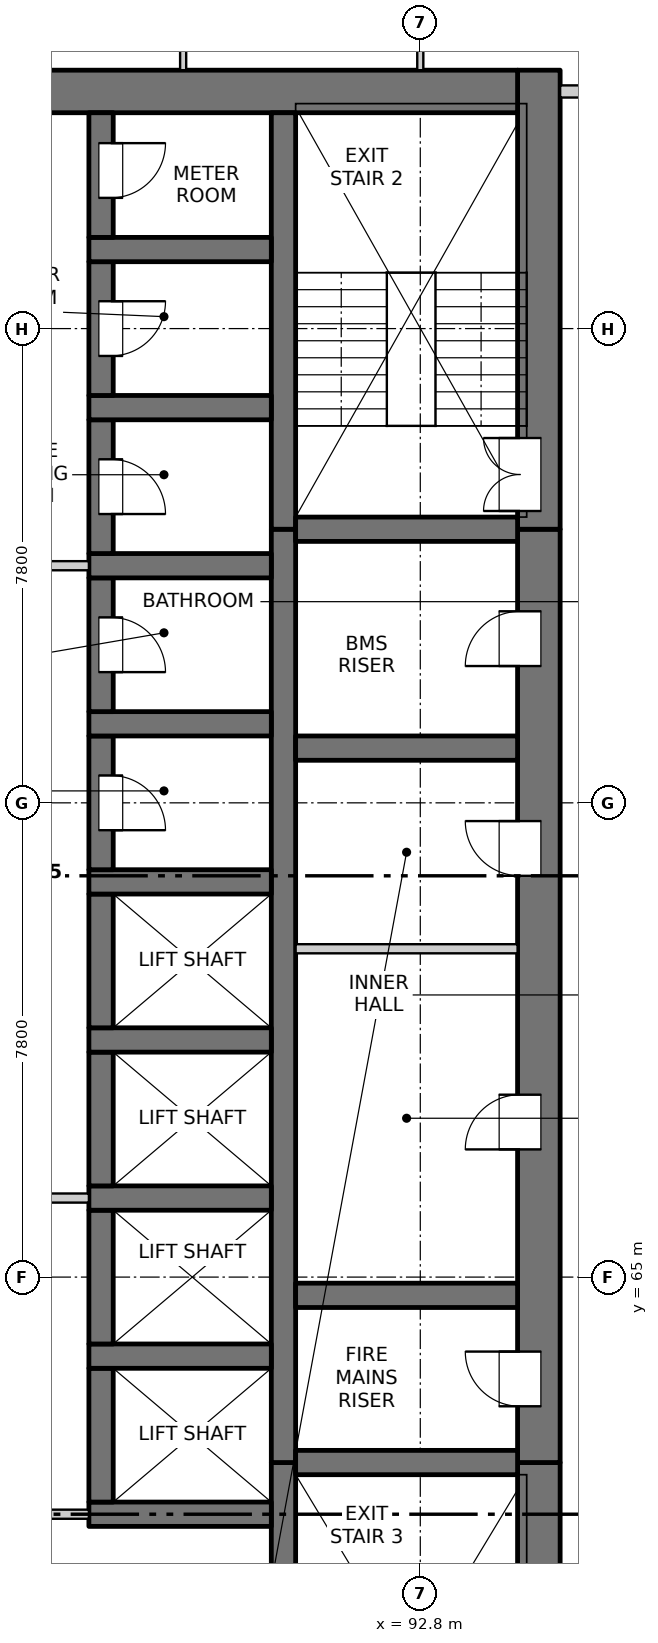
"""IFC4 building model, lengths in metres.
Left out: names, types, materials, properties, quantities, classifications, styles, units other than length and angle.
Written with IfcOpenShell. Run it as: python <this file> out.ifc"""

import sys

from ifc_helpers import new_model, si_unit, direction, frame, frame_2d, origin, place, context, subcontext, project, spatial, rectangle, extrude, element, fill, save


model = new_model("IFC4")
c1 = context("Model", 3, precision=1e-05, world=origin(), true_north=direction((0.0, 1.0)))
c2 = subcontext(c1, "Body", "Model", "MODEL_VIEW")
j1 = project(units=[si_unit("LENGTHUNIT", "METRE"), si_unit("PLANEANGLEUNIT", "RADIAN")], contexts=[c1])
p1 = place(None, origin())
s1 = spatial("IfcSite", under=j1, at=p1, CompositionType="ELEMENT")
p2 = place(p1, origin())
s2 = spatial("IfcBuilding", under=s1, at=p2, CompositionType="ELEMENT")
p3 = place(p2, frame((0.0, 0.0, 43.3)))
s3 = spatial("IfcBuildingStorey", under=s2, at=p3, CompositionType="ELEMENT", Elevation=43.3)
p4 = place(p3, frame((94.75, 54.9, -0.25), z_axis=(0.0, 0.0, 1.0), x_axis=(0.0, 1.0, 0.0)))
e1 = element("IfcWall", 1, at=p4, inside=s3, PredefinedType="SOLIDWALL", context=c2, shape_type="SweptSolid", body=[
    extrude(rectangle(XDim=7.05, YDim=0.7, at=frame_2d((3.525, 0.0))), origin(), (0.0, 0.0, 1.0), 3.35),
])
p5 = place(p4, frame((0.75, 0.0, 0.25)))
e2 = element("IfcOpeningElement", 2, at=p5, cuts=e1, PredefinedType="OPENING", context=c2, shape_type="SweptSolid", body=[
    extrude(rectangle(XDim=1.2, YDim=2.1, at=frame_2d((0.6, 1.05))), frame((0.0, 0.36, 0.0), z_axis=(0.0, -1.0, 0.0), x_axis=(1.0, 0.0, 0.0)), (0.0, 0.0, 1.0), 0.72),
])
p6 = place(p3, frame((94.75, 61.95, -0.25), z_axis=(0.0, 0.0, 1.0), x_axis=(0.0, 1.0, 0.0)))
e3 = element("IfcWall", 3, at=p6, inside=s3, PredefinedType="SOLIDWALL", context=c2, shape_type="SweptSolid", body=[
    extrude(rectangle(XDim=15.35, YDim=0.7, at=frame_2d((7.675, 0.0))), origin(), (0.0, 0.0, 1.0), 3.35),
])
p7 = place(p6, frame((0.925, 0.0, 0.25)))
e4 = element("IfcOpeningElement", 4, at=p7, cuts=e3, PredefinedType="OPENING", context=c2, shape_type="SweptSolid", body=[
    extrude(rectangle(XDim=0.9, YDim=2.1, at=frame_2d((0.45, 1.05))), frame((0.0, 0.36, 0.0), z_axis=(0.0, -1.0, 0.0), x_axis=(1.0, 0.0, 0.0)), (0.0, 0.0, 1.0), 0.72),
])
p8 = place(p6, frame((5.15, 0.0, 0.25)))
e5 = element("IfcOpeningElement", 5, at=p8, cuts=e3, PredefinedType="OPENING", context=c2, shape_type="SweptSolid", body=[
    extrude(rectangle(XDim=0.9, YDim=2.1, at=frame_2d((0.45, 1.05))), frame((0.0, 0.36, 0.0), z_axis=(0.0, -1.0, 0.0), x_axis=(1.0, 0.0, 0.0)), (0.0, 0.0, 1.0), 0.72),
])
p9 = place(p6, frame((9.65, 0.0, 0.25)))
e6 = element("IfcOpeningElement", 6, at=p9, cuts=e3, PredefinedType="OPENING", context=c2, shape_type="SweptSolid", body=[
    extrude(rectangle(XDim=0.9, YDim=2.1, at=frame_2d((0.45, 1.05))), frame((0.0, 0.36, 0.0), z_axis=(0.0, -1.0, 0.0), x_axis=(1.0, 0.0, 0.0)), (0.0, 0.0, 1.0), 0.72),
])
p10 = place(p6, frame((13.1, 0.0, 0.25)))
e7 = element("IfcOpeningElement", 7, at=p10, cuts=e3, PredefinedType="OPENING", context=c2, shape_type="SweptSolid", body=[
    extrude(rectangle(XDim=0.9, YDim=2.1, at=frame_2d((0.45, 1.05))), frame((0.0, 0.36, 0.0), z_axis=(0.0, -1.0, 0.0), x_axis=(1.0, 0.0, 0.0)), (0.0, 0.0, 1.0), 0.72),
])
p11 = place(p3, frame((94.75, 77.3, -0.25), z_axis=(0.0, 0.0, 1.0), x_axis=(0.0, 1.0, 0.0)))
e8 = element("IfcWall", 8, at=p11, inside=s3, PredefinedType="SOLIDWALL", context=c2, shape_type="SweptSolid", body=[
    extrude(rectangle(XDim=7.55, YDim=0.7, at=frame_2d((3.775, 0.0))), origin(), (0.0, 0.0, 1.0), 3.35),
])
p12 = place(p11, frame((0.3, 0.0, 0.25)))
e9 = element("IfcOpeningElement", 9, at=p12, cuts=e8, PredefinedType="OPENING", context=c2, shape_type="SweptSolid", body=[
    extrude(rectangle(XDim=1.2, YDim=2.1, at=frame_2d((0.6, 1.05))), frame((0.0, 0.36, 0.0), z_axis=(0.0, -1.0, 0.0), x_axis=(1.0, 0.0, 0.0)), (0.0, 0.0, 1.0), 0.72),
])
p13 = place(p3, frame((75.6, 84.5, -0.25), z_axis=(0.0, 0.0, 1.0), x_axis=(1.0, 0.0, 0.0)))
e10 = element("IfcWall", 10, at=p13, inside=s3, PredefinedType="SOLIDWALL", context=c2, shape_type="SweptSolid", body=[
    extrude(rectangle(XDim=18.8, YDim=0.7, at=frame_2d((9.4, 0.0))), origin(), (0.0, 0.0, 1.0), 3.35),
])
p14 = place(p3, frame((90.55, 55.6, -0.25), z_axis=(0.0, 0.0, 1.0), x_axis=(0.0, 1.0, 0.0)))
e11 = element("IfcWall", 11, at=p14, inside=s3, PredefinedType="SOLIDWALL", context=c2, shape_type="SweptSolid", body=[
    extrude(rectangle(XDim=6.35, YDim=0.4, at=frame_2d((3.175, 0.0))), origin(), (0.0, 0.0, 1.0), 3.35),
])
p15 = place(p3, frame((90.55, 61.95, -0.25), z_axis=(0.0, 0.0, 1.0), x_axis=(0.0, 1.0, 0.0)))
e12 = element("IfcWall", 12, at=p15, inside=s3, PredefinedType="SOLIDWALL", context=c2, shape_type="SweptSolid", body=[
    extrude(rectangle(XDim=15.35, YDim=0.4, at=frame_2d((7.675, 0.0))), origin(), (0.0, 0.0, 1.0), 3.35),
])
p16 = place(p3, frame((90.55, 77.3, -0.25), z_axis=(0.0, 0.0, 1.0), x_axis=(0.0, 1.0, 0.0)))
e13 = element("IfcWall", 13, at=p16, inside=s3, PredefinedType="SOLIDWALL", context=c2, shape_type="SweptSolid", body=[
    extrude(rectangle(XDim=6.85, YDim=0.4, at=frame_2d((3.425, 0.0))), origin(), (0.0, 0.0, 1.0), 3.35),
])
p17 = place(p3, frame((87.35, 61.1, -0.25), z_axis=(0.0, 0.0, 1.0), x_axis=(1.0, 0.0, 0.0)))
e14 = element("IfcWall", 14, at=p17, inside=s3, PredefinedType="SOLIDWALL", context=c2, shape_type="SweptSolid", body=[
    extrude(rectangle(XDim=3.0, YDim=0.4, at=frame_2d((1.5, 0.0))), origin(), (0.0, 0.0, 1.0), 3.35),
])
p18 = place(p3, frame((87.55, 61.3, -0.25), z_axis=(0.0, 0.0, 1.0), x_axis=(0.0, 1.0, 0.0)))
e15 = element("IfcWall", 15, at=p18, inside=s3, PredefinedType="SOLIDWALL", context=c2, shape_type="SweptSolid", body=[
    extrude(rectangle(XDim=2.2, YDim=0.4, at=frame_2d((1.1, 0.0))), origin(), (0.0, 0.0, 1.0), 3.35),
])
p19 = place(p3, frame((87.35, 63.7, -0.25), z_axis=(0.0, 0.0, 1.0), x_axis=(1.0, 0.0, 0.0)))
e16 = element("IfcWall", 16, at=p19, inside=s3, PredefinedType="SOLIDWALL", context=c2, shape_type="SweptSolid", body=[
    extrude(rectangle(XDim=3.0, YDim=0.4, at=frame_2d((1.5, 0.0))), origin(), (0.0, 0.0, 1.0), 3.35),
])
p20 = place(p3, frame((87.55, 63.9, -0.25), z_axis=(0.0, 0.0, 1.0), x_axis=(0.0, 1.0, 0.0)))
e17 = element("IfcWall", 17, at=p20, inside=s3, PredefinedType="SOLIDWALL", context=c2, shape_type="SweptSolid", body=[
    extrude(rectangle(XDim=2.2, YDim=0.4, at=frame_2d((1.1, 0.0))), origin(), (0.0, 0.0, 1.0), 3.35),
])
p21 = place(p3, frame((87.35, 66.3, -0.25), z_axis=(0.0, 0.0, 1.0), x_axis=(1.0, 0.0, 0.0)))
e18 = element("IfcWall", 18, at=p21, inside=s3, PredefinedType="SOLIDWALL", context=c2, shape_type="SweptSolid", body=[
    extrude(rectangle(XDim=3.0, YDim=0.4, at=frame_2d((1.5, 0.0))), origin(), (0.0, 0.0, 1.0), 3.35),
])
p22 = place(p3, frame((87.55, 66.5, -0.25), z_axis=(0.0, 0.0, 1.0), x_axis=(0.0, 1.0, 0.0)))
e19 = element("IfcWall", 19, at=p22, inside=s3, PredefinedType="SOLIDWALL", context=c2, shape_type="SweptSolid", body=[
    extrude(rectangle(XDim=2.2, YDim=0.4, at=frame_2d((1.1, 0.0))), origin(), (0.0, 0.0, 1.0), 3.35),
])
p23 = place(p3, frame((87.35, 68.9, -0.25), z_axis=(0.0, 0.0, 1.0), x_axis=(1.0, 0.0, 0.0)))
e20 = element("IfcWall", 20, at=p23, inside=s3, PredefinedType="SOLIDWALL", context=c2, shape_type="SweptSolid", body=[
    extrude(rectangle(XDim=3.0, YDim=0.4, at=frame_2d((1.5, 0.0))), origin(), (0.0, 0.0, 1.0), 3.35),
])
p24 = place(p3, frame((87.55, 69.1, -0.25), z_axis=(0.0, 0.0, 1.0), x_axis=(0.0, 1.0, 0.0)))
e21 = element("IfcWall", 21, at=p24, inside=s3, PredefinedType="SOLIDWALL", context=c2, shape_type="SweptSolid", body=[
    extrude(rectangle(XDim=2.2, YDim=0.4, at=frame_2d((1.1, 0.0))), origin(), (0.0, 0.0, 1.0), 3.35),
])
p25 = place(p3, frame((87.35, 71.5, -0.25), z_axis=(0.0, 0.0, 1.0), x_axis=(1.0, 0.0, 0.0)))
e22 = element("IfcWall", 22, at=p25, inside=s3, PredefinedType="SOLIDWALL", context=c2, shape_type="SweptSolid", body=[
    extrude(rectangle(XDim=3.0, YDim=0.4, at=frame_2d((1.5, 0.0))), origin(), (0.0, 0.0, 1.0), 3.35),
])
p26 = place(p3, frame((87.55, 71.7, -0.25), z_axis=(0.0, 0.0, 1.0), x_axis=(0.0, 1.0, 0.0)))
e23 = element("IfcWall", 23, at=p26, inside=s3, PredefinedType="SOLIDWALL", context=c2, shape_type="SweptSolid", body=[
    extrude(rectangle(XDim=2.2, YDim=0.4, at=frame_2d((1.1, 0.0))), origin(), (0.0, 0.0, 1.0), 3.35),
])
p27 = place(p26, frame((0.65, 0.0, 0.25)))
e24 = element("IfcOpeningElement", 24, at=p27, cuts=e23, PredefinedType="OPENING", context=c2, shape_type="SweptSolid", body=[
    extrude(rectangle(XDim=0.9, YDim=2.1, at=frame_2d((0.45, 1.05))), frame((0.0, 0.21, 0.0), z_axis=(0.0, -1.0, 0.0), x_axis=(1.0, 0.0, 0.0)), (0.0, 0.0, 1.0), 0.42),
])
p28 = place(p3, frame((87.35, 74.1, -0.25), z_axis=(0.0, 0.0, 1.0), x_axis=(1.0, 0.0, 0.0)))
e25 = element("IfcWall", 25, at=p28, inside=s3, PredefinedType="SOLIDWALL", context=c2, shape_type="SweptSolid", body=[
    extrude(rectangle(XDim=3.0, YDim=0.4, at=frame_2d((1.5, 0.0))), origin(), (0.0, 0.0, 1.0), 3.35),
])
p29 = place(p3, frame((87.55, 74.3, -0.25), z_axis=(0.0, 0.0, 1.0), x_axis=(0.0, 1.0, 0.0)))
e26 = element("IfcWall", 26, at=p29, inside=s3, PredefinedType="SOLIDWALL", context=c2, shape_type="SweptSolid", body=[
    extrude(rectangle(XDim=2.2, YDim=0.4, at=frame_2d((1.1, 0.0))), origin(), (0.0, 0.0, 1.0), 3.35),
])
p30 = place(p29, frame((0.65, 0.0, 0.25)))
e27 = element("IfcOpeningElement", 27, at=p30, cuts=e26, PredefinedType="OPENING", context=c2, shape_type="SweptSolid", body=[
    extrude(rectangle(XDim=0.9, YDim=2.1, at=frame_2d((0.45, 1.05))), frame((0.0, 0.21, 0.0), z_axis=(0.0, -1.0, 0.0), x_axis=(1.0, 0.0, 0.0)), (0.0, 0.0, 1.0), 0.42),
])
p31 = place(p3, frame((87.35, 76.7, -0.25), z_axis=(0.0, 0.0, 1.0), x_axis=(1.0, 0.0, 0.0)))
e28 = element("IfcWall", 28, at=p31, inside=s3, PredefinedType="SOLIDWALL", context=c2, shape_type="SweptSolid", body=[
    extrude(rectangle(XDim=3.0, YDim=0.4, at=frame_2d((1.5, 0.0))), origin(), (0.0, 0.0, 1.0), 3.35),
])
p32 = place(p3, frame((87.55, 76.9, -0.25), z_axis=(0.0, 0.0, 1.0), x_axis=(0.0, 1.0, 0.0)))
e29 = element("IfcWall", 29, at=p32, inside=s3, PredefinedType="SOLIDWALL", context=c2, shape_type="SweptSolid", body=[
    extrude(rectangle(XDim=2.2, YDim=0.4, at=frame_2d((1.1, 0.0))), origin(), (0.0, 0.0, 1.0), 3.35),
])
p33 = place(p32, frame((0.65, 0.0, 0.25)))
e30 = element("IfcOpeningElement", 30, at=p33, cuts=e29, PredefinedType="OPENING", context=c2, shape_type="SweptSolid", body=[
    extrude(rectangle(XDim=0.9, YDim=2.1, at=frame_2d((0.45, 1.05))), frame((0.0, 0.21, 0.0), z_axis=(0.0, -1.0, 0.0), x_axis=(1.0, 0.0, 0.0)), (0.0, 0.0, 1.0), 0.42),
])
p34 = place(p3, frame((87.35, 79.3, -0.25), z_axis=(0.0, 0.0, 1.0), x_axis=(1.0, 0.0, 0.0)))
e31 = element("IfcWall", 31, at=p34, inside=s3, PredefinedType="SOLIDWALL", context=c2, shape_type="SweptSolid", body=[
    extrude(rectangle(XDim=3.0, YDim=0.4, at=frame_2d((1.5, 0.0))), origin(), (0.0, 0.0, 1.0), 3.35),
])
p35 = place(p3, frame((87.55, 79.5, -0.25), z_axis=(0.0, 0.0, 1.0), x_axis=(0.0, 1.0, 0.0)))
e32 = element("IfcWall", 32, at=p35, inside=s3, PredefinedType="SOLIDWALL", context=c2, shape_type="SweptSolid", body=[
    extrude(rectangle(XDim=2.2, YDim=0.4, at=frame_2d((1.1, 0.0))), origin(), (0.0, 0.0, 1.0), 3.35),
])
p36 = place(p35, frame((0.65, 0.0, 0.25)))
e33 = element("IfcOpeningElement", 33, at=p36, cuts=e32, PredefinedType="OPENING", context=c2, shape_type="SweptSolid", body=[
    extrude(rectangle(XDim=0.9, YDim=2.1, at=frame_2d((0.45, 1.05))), frame((0.0, 0.21, 0.0), z_axis=(0.0, -1.0, 0.0), x_axis=(1.0, 0.0, 0.0)), (0.0, 0.0, 1.0), 0.42),
])
p37 = place(p3, frame((87.35, 81.9, -0.25), z_axis=(0.0, 0.0, 1.0), x_axis=(1.0, 0.0, 0.0)))
e34 = element("IfcWall", 34, at=p37, inside=s3, PredefinedType="SOLIDWALL", context=c2, shape_type="SweptSolid", body=[
    extrude(rectangle(XDim=3.0, YDim=0.4, at=frame_2d((1.5, 0.0))), origin(), (0.0, 0.0, 1.0), 3.35),
])
p38 = place(p3, frame((87.55, 82.1, -0.25), z_axis=(0.0, 0.0, 1.0), x_axis=(0.0, 1.0, 0.0)))
e35 = element("IfcWall", 35, at=p38, inside=s3, PredefinedType="SOLIDWALL", context=c2, shape_type="SweptSolid", body=[
    extrude(rectangle(XDim=2.05, YDim=0.4, at=frame_2d((1.025, 0.0))), origin(), (0.0, 0.0, 1.0), 3.35),
])
p39 = place(p38, frame((0.65, 0.0, 0.25)))
e36 = element("IfcOpeningElement", 36, at=p39, cuts=e35, PredefinedType="OPENING", context=c2, shape_type="SweptSolid", body=[
    extrude(rectangle(XDim=0.9, YDim=2.1, at=frame_2d((0.45, 1.05))), frame((0.0, 0.21, 0.0), z_axis=(0.0, -1.0, 0.0), x_axis=(1.0, 0.0, 0.0)), (0.0, 0.0, 1.0), 0.42),
])
for number, where, z_axis, x_axis in (
    (37, (90.75, 61.95, -0.25), (0.0, 0.0, 1.0), (1.0, 0.0, 0.0)),
    (38, (90.75, 64.7, -0.25), (0.0, 0.0, 1.0), (1.0, 0.0, 0.0)),
    (39, (90.75, 73.7, -0.25), (0.0, 0.0, 1.0), (1.0, 0.0, 0.0)),
    (40, (90.75, 77.3, -0.25), (0.0, 0.0, 1.0), (1.0, 0.0, 0.0)),
):
    element("IfcWall", number, at=place(p3, frame(where, z_axis=z_axis, x_axis=x_axis)), inside=s3, PredefinedType="SOLIDWALL", context=c2, shape_type="SweptSolid", body=[
        extrude(rectangle(XDim=3.65, YDim=0.4, at=frame_2d((1.825, 0.0))), origin(), (0.0, 0.0, 1.0), 3.35),
    ])
p40 = place(p3, frame((82.65, 61.1, 0.0), z_axis=(0.0, 0.0, 1.0), x_axis=(1.0, 0.0, 0.0)))
e41 = element("IfcWall", 41, at=p40, inside=s3, PredefinedType="PARTITIONING", context=c2, shape_type="SweptSolid", body=[
    extrude(rectangle(XDim=4.7, YDim=0.15, at=frame_2d((2.35, 0.0))), origin(), (0.0, 0.0, 1.0), 3.1),
])
p41 = place(p40, frame((1.45, 0.0, 0.0)))
e42 = element("IfcOpeningElement", 42, at=p41, cuts=e41, PredefinedType="OPENING", context=c2, shape_type="SweptSolid", body=[
    extrude(rectangle(XDim=1.8, YDim=2.1, at=frame_2d((0.9, 1.05))), frame((0.0, 0.085, 0.0), z_axis=(0.0, -1.0, 0.0), x_axis=(1.0, 0.0, 0.0)), (0.0, 0.0, 1.0), 0.17),
])
p42 = place(p3, frame((82.65, 66.3, 0.0), z_axis=(0.0, 0.0, 1.0), x_axis=(1.0, 0.0, 0.0)))
e43 = element("IfcWall", 43, at=p42, inside=s3, PredefinedType="PARTITIONING", context=c2, shape_type="SweptSolid", body=[
    extrude(rectangle(XDim=4.7, YDim=0.15, at=frame_2d((2.35, 0.0))), origin(), (0.0, 0.0, 1.0), 3.1),
])
p43 = place(p42, frame((1.45, 0.0, 0.0)))
e44 = element("IfcOpeningElement", 44, at=p43, cuts=e43, PredefinedType="OPENING", context=c2, shape_type="SweptSolid", body=[
    extrude(rectangle(XDim=1.8, YDim=2.1, at=frame_2d((0.9, 1.05))), frame((0.0, 0.085, 0.0), z_axis=(0.0, -1.0, 0.0), x_axis=(1.0, 0.0, 0.0)), (0.0, 0.0, 1.0), 0.17),
])
p44 = place(p3, frame((90.75, 70.4, 0.0), z_axis=(0.0, 0.0, 1.0), x_axis=(1.0, 0.0, 0.0)))
e45 = element("IfcWall", 45, at=p44, inside=s3, PredefinedType="PARTITIONING", context=c2, shape_type="SweptSolid", body=[
    extrude(rectangle(XDim=3.65, YDim=0.15, at=frame_2d((1.825, 0.0))), origin(), (0.0, 0.0, 1.0), 3.1),
])
p45 = place(p3, frame((82.65, 76.7, 0.0), z_axis=(0.0, 0.0, 1.0), x_axis=(1.0, 0.0, 0.0)))
e46 = element("IfcWall", 46, at=p45, inside=s3, PredefinedType="PARTITIONING", context=c2, shape_type="SweptSolid", body=[
    extrude(rectangle(XDim=4.7, YDim=0.15, at=frame_2d((2.35, 0.0))), origin(), (0.0, 0.0, 1.0), 3.1),
])
p46 = place(p45, frame((1.45, 0.0, 0.0)))
e47 = element("IfcOpeningElement", 47, at=p46, cuts=e46, PredefinedType="OPENING", context=c2, shape_type="SweptSolid", body=[
    extrude(rectangle(XDim=1.8, YDim=2.1, at=frame_2d((0.9, 1.05))), frame((0.0, 0.085, 0.0), z_axis=(0.0, -1.0, 0.0), x_axis=(1.0, 0.0, 0.0)), (0.0, 0.0, 1.0), 0.17),
])
p47 = place(p3, frame((95.1, 84.5, 0.0), z_axis=(0.0, 0.0, 1.0), x_axis=(1.0, 0.0, 0.0)))
e48 = element("IfcWall", 48, at=p47, inside=s3, PredefinedType="PARTITIONING", context=c2, shape_type="SweptSolid", body=[
    extrude(rectangle(XDim=1.7, YDim=0.2, at=frame_2d((0.85, 0.0))), origin(), (0.0, 0.0, 1.0), 3.1),
])
p48 = place(p3, frame((88.9, 84.85, 0.0), z_axis=(0.0, 0.0, 1.0), x_axis=(0.0, 1.0, 0.0)))
e49 = element("IfcWall", 49, at=p48, inside=s3, PredefinedType="PARTITIONING", context=c2, shape_type="SweptSolid", body=[
    extrude(rectangle(XDim=3.25, YDim=0.1, at=frame_2d((1.625, 0.0))), origin(), (0.0, 0.0, 1.0), 3.1),
])
p49 = place(p48, frame((1.15, 0.0, 0.0)))
e50 = element("IfcOpeningElement", 50, at=p49, cuts=e49, PredefinedType="OPENING", context=c2, shape_type="SweptSolid", body=[
    extrude(rectangle(XDim=0.9, YDim=2.1, at=frame_2d((0.45, 1.05))), frame((0.0, 0.06, 0.0), z_axis=(0.0, -1.0, 0.0), x_axis=(1.0, 0.0, 0.0)), (0.0, 0.0, 1.0), 0.12),
])
p50 = place(p3, frame((92.8, 84.85, 0.0), z_axis=(0.0, 0.0, 1.0), x_axis=(0.0, 1.0, 0.0)))
e51 = element("IfcWall", 51, at=p50, inside=s3, PredefinedType="PARTITIONING", context=c2, shape_type="SweptSolid", body=[
    extrude(rectangle(XDim=3.25, YDim=0.1, at=frame_2d((1.625, 0.0))), origin(), (0.0, 0.0, 1.0), 3.1),
])
p51 = place(p50, frame((1.15, 0.0, 0.0)))
e52 = element("IfcOpeningElement", 52, at=p51, cuts=e51, PredefinedType="OPENING", context=c2, shape_type="SweptSolid", body=[
    extrude(rectangle(XDim=0.9, YDim=2.1, at=frame_2d((0.45, 1.05))), frame((0.0, 0.06, 0.0), z_axis=(0.0, -1.0, 0.0), x_axis=(1.0, 0.0, 0.0)), (0.0, 0.0, 1.0), 0.12),
])
p52 = place(p7, origin())
e53 = element("IfcDoor", 53, at=p52, inside=s3, OperationType="SINGLE_SWING_RIGHT", PredefinedType="DOOR", context=c2, shape_type="SweptSolid", body=[
    extrude(rectangle(XDim=0.9, YDim=2.1, at=frame_2d((0.45, 1.05))), frame((0.0, 0.335, 0.0), z_axis=(0.0, -1.0, 0.0), x_axis=(1.0, 0.0, 0.0)), (0.0, 0.0, 1.0), 0.05),
])
fill(e4, e53)
p53 = place(p8, origin())
e54 = element("IfcDoor", 54, at=p53, inside=s3, OperationType="SINGLE_SWING_LEFT", PredefinedType="DOOR", context=c2, shape_type="SweptSolid", body=[
    extrude(rectangle(XDim=0.9, YDim=2.1, at=frame_2d((0.45, 1.05))), frame((0.0, 0.335, 0.0), z_axis=(0.0, -1.0, 0.0), x_axis=(1.0, 0.0, 0.0)), (0.0, 0.0, 1.0), 0.05),
])
fill(e5, e54)
p54 = place(p9, origin())
e55 = element("IfcDoor", 55, at=p54, inside=s3, OperationType="SINGLE_SWING_RIGHT", PredefinedType="DOOR", context=c2, shape_type="SweptSolid", body=[
    extrude(rectangle(XDim=0.9, YDim=2.1, at=frame_2d((0.45, 1.05))), frame((0.0, 0.335, 0.0), z_axis=(0.0, -1.0, 0.0), x_axis=(1.0, 0.0, 0.0)), (0.0, 0.0, 1.0), 0.05),
])
fill(e6, e55)
p55 = place(p27, origin())
e56 = element("IfcDoor", 56, at=p55, inside=s3, OperationType="SINGLE_SWING_RIGHT", PredefinedType="DOOR", context=c2, shape_type="SweptSolid", body=[
    extrude(rectangle(XDim=0.9, YDim=2.1, at=frame_2d((0.45, 1.05))), frame((0.0, -0.135, 0.0), z_axis=(0.0, -1.0, 0.0), x_axis=(1.0, 0.0, 0.0)), (0.0, 0.0, 1.0), 0.05),
])
fill(e24, e56)
p56 = place(p30, origin())
e57 = element("IfcDoor", 57, at=p56, inside=s3, OperationType="SINGLE_SWING_RIGHT", PredefinedType="DOOR", context=c2, shape_type="SweptSolid", body=[
    extrude(rectangle(XDim=0.9, YDim=2.1, at=frame_2d((0.45, 1.05))), frame((0.0, -0.135, 0.0), z_axis=(0.0, -1.0, 0.0), x_axis=(1.0, 0.0, 0.0)), (0.0, 0.0, 1.0), 0.05),
])
fill(e27, e57)
p57 = place(p10, origin())
e58 = element("IfcDoor", 58, at=p57, inside=s3, OperationType="SINGLE_SWING_LEFT", PredefinedType="DOOR", context=c2, shape_type="SweptSolid", body=[
    extrude(rectangle(XDim=0.9, YDim=2.1, at=frame_2d((0.45, 1.05))), frame((0.0, 0.335, 0.0), z_axis=(0.0, -1.0, 0.0), x_axis=(1.0, 0.0, 0.0)), (0.0, 0.0, 1.0), 0.05),
])
fill(e7, e58)
p58 = place(p33, origin())
e59 = element("IfcDoor", 59, at=p58, inside=s3, OperationType="SINGLE_SWING_RIGHT", PredefinedType="DOOR", context=c2, shape_type="SweptSolid", body=[
    extrude(rectangle(XDim=0.9, YDim=2.1, at=frame_2d((0.45, 1.05))), frame((0.0, -0.135, 0.0), z_axis=(0.0, -1.0, 0.0), x_axis=(1.0, 0.0, 0.0)), (0.0, 0.0, 1.0), 0.05),
])
fill(e30, e59)
p59 = place(p12, origin())
e60 = element("IfcDoor", 60, at=p59, inside=s3, OperationType="DOUBLE_DOOR_SINGLE_SWING", PredefinedType="DOOR", context=c2, shape_type="SweptSolid", body=[
    extrude(rectangle(XDim=1.2, YDim=2.1, at=frame_2d((0.6, 1.05))), frame((0.0, 0.335, 0.0), z_axis=(0.0, -1.0, 0.0), x_axis=(1.0, 0.0, 0.0)), (0.0, 0.0, 1.0), 0.05),
])
fill(e9, e60)
p60 = place(p36, origin())
e61 = element("IfcDoor", 61, at=p60, inside=s3, OperationType="SINGLE_SWING_LEFT", PredefinedType="DOOR", context=c2, shape_type="SweptSolid", body=[
    extrude(rectangle(XDim=0.9, YDim=2.1, at=frame_2d((0.45, 1.05))), frame((0.0, -0.135, 0.0), z_axis=(0.0, -1.0, 0.0), x_axis=(1.0, 0.0, 0.0)), (0.0, 0.0, 1.0), 0.05),
])
fill(e33, e61)
p61 = place(p39, origin())
e62 = element("IfcDoor", 62, at=p61, inside=s3, OperationType="SINGLE_SWING_LEFT", PredefinedType="DOOR", context=c2, shape_type="SweptSolid", body=[
    extrude(rectangle(XDim=0.9, YDim=2.1, at=frame_2d((0.45, 1.05))), frame((0.0, -0.135, 0.0), z_axis=(0.0, -1.0, 0.0), x_axis=(1.0, 0.0, 0.0)), (0.0, 0.0, 1.0), 0.05),
])
fill(e36, e62)
save(model, sys.argv[1])
